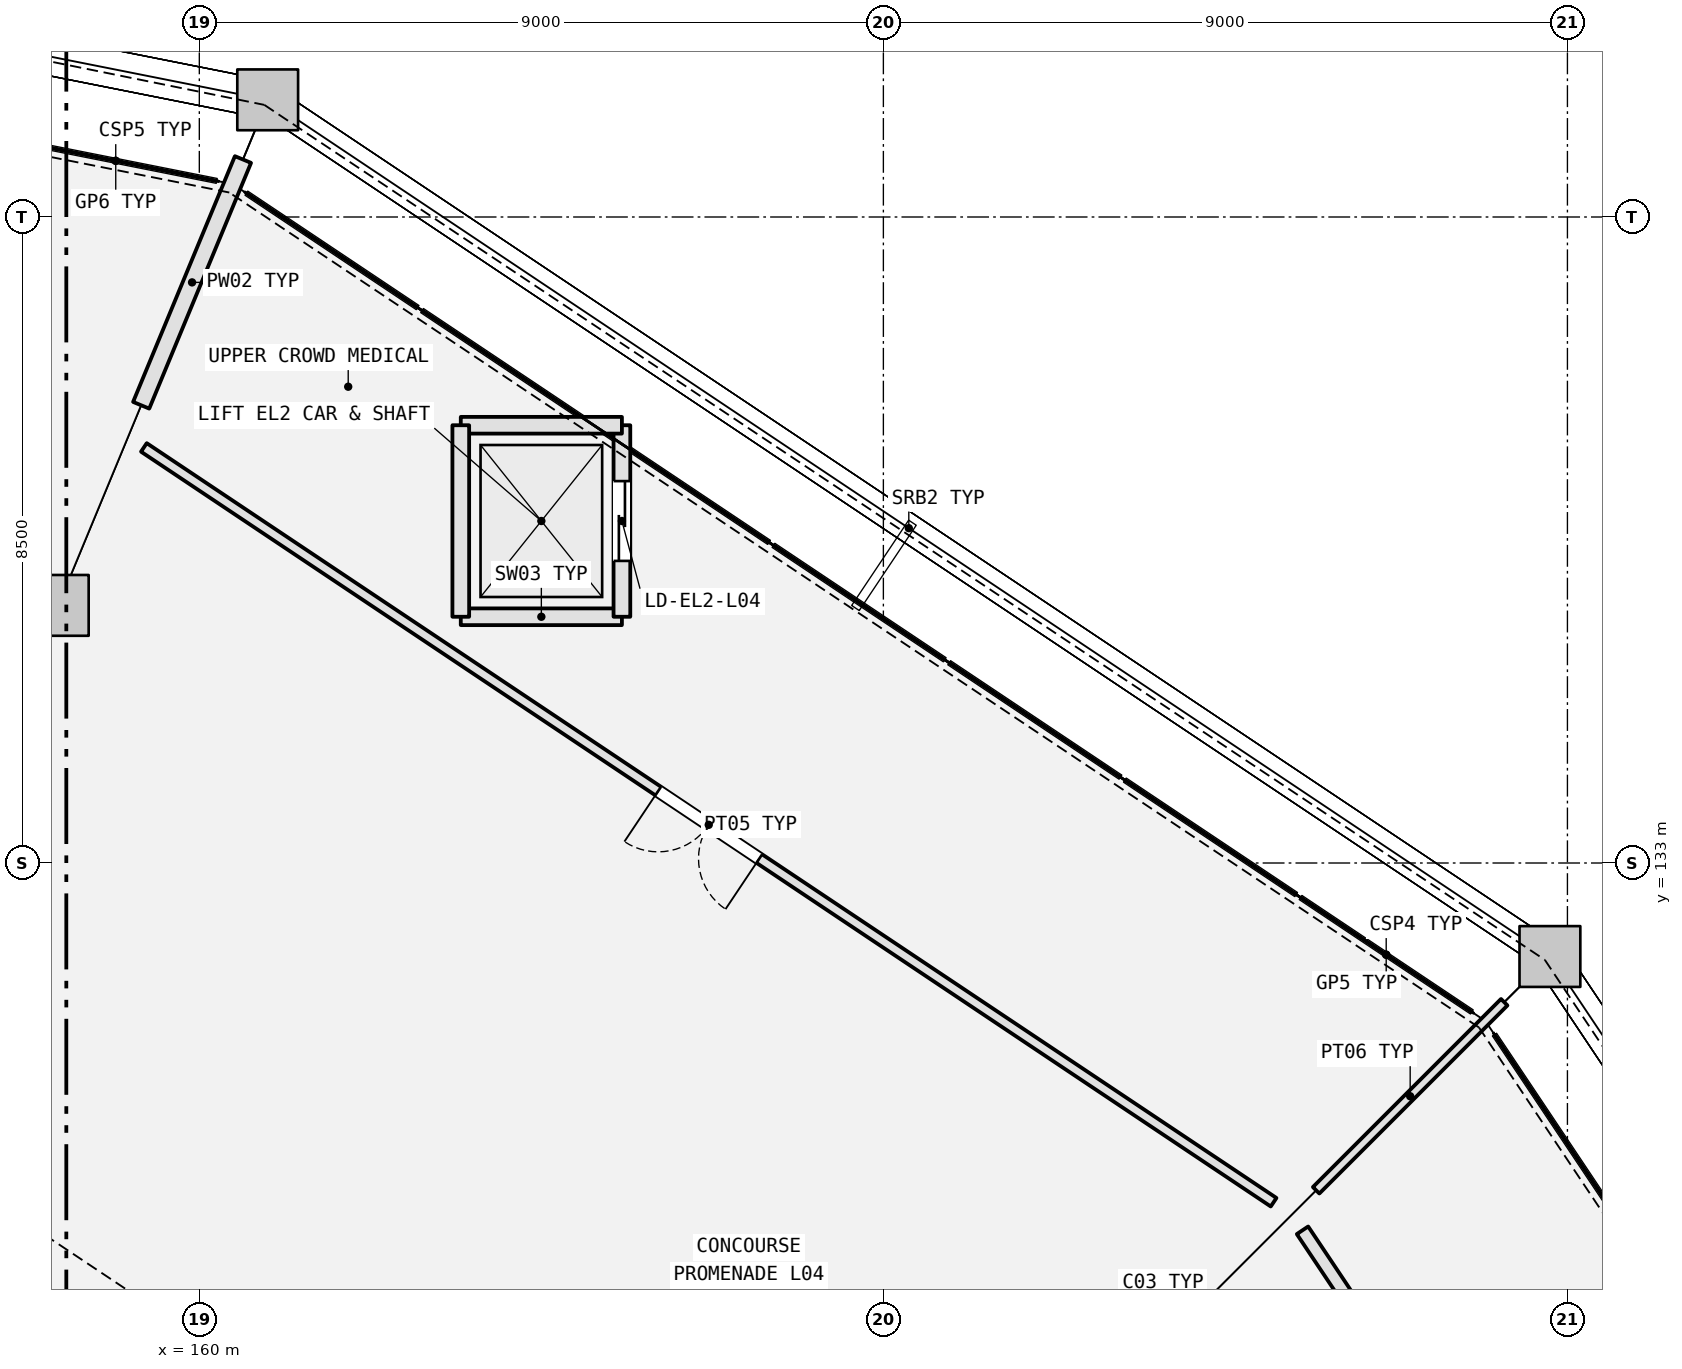
"""IFC4 building model, lengths in metres.
Left out: names, types, materials, properties, quantities, classifications, styles, units other than length and angle.
Written with IfcOpenShell. Run it as: python <this file> out.ifc"""

import sys

from ifc_helpers import new_model, si_unit, direction, frame, frame_2d, origin, origin_2d, place, context, subcontext, project, spatial, rectangle, extrude, element, fill, save


model = new_model("IFC4")
c1 = context("Model", 3, precision=1e-05, world=origin(), true_north=direction((0.0, 1.0)))
c2 = subcontext(c1, "Body", "Model", "MODEL_VIEW")
j1 = project(units=[si_unit("LENGTHUNIT", "METRE"), si_unit("PLANEANGLEUNIT", "RADIAN")], contexts=[c1])
p1 = place(None, origin())
s1 = spatial("IfcSite", under=j1, at=p1, CompositionType="ELEMENT")
p2 = place(p1, origin())
s2 = spatial("IfcBuilding", under=s1, at=p2, CompositionType="ELEMENT")
p3 = place(p2, frame((0.0, 0.0, 21.6)))
s3 = spatial("IfcBuildingStorey", under=s2, at=p3, CompositionType="ELEMENT", Elevation=21.6)
for number, where, z_axis, x_axis in (
    (1, (177.77, 131.77, 0.0), (0.0, 0.0, 1.0), (1.0, 0.0, 0.0)),
    (2, (158.144, 136.39, 0.0), (0.0, 0.0, 1.0), (1.0, 0.0, 0.0)),
    (3, (160.9, 143.042, 0.0), (0.0, 0.0, 1.0), (1.0, 0.0, 0.0)),
):
    element("IfcColumn", number, at=place(p3, frame(where, z_axis=z_axis, x_axis=x_axis)), inside=s3, PredefinedType="COLUMN", context=c2, shape_type="SweptSolid", body=[
        extrude(rectangle(XDim=0.8, YDim=0.8, at=origin_2d()), origin(), (0.0, 0.0, 1.0), 5.4),
    ])
p4 = place(p3, frame((163.44, 136.24, 0.0), z_axis=(0.0, 0.0, 1.0), x_axis=(1.0, 0.0, 0.0)))
e4 = element("IfcWall", 4, at=p4, inside=s3, PredefinedType="SHEAR", context=c2, shape_type="SweptSolid", body=[
    extrude(rectangle(XDim=2.12, YDim=0.22, at=frame_2d((1.06, 0.0))), origin(), (0.0, 0.0, 1.0), 5.15),
])
p5 = place(p3, frame((165.56, 136.24, 0.0), z_axis=(0.0, 0.0, 1.0), x_axis=(0.0, 1.0, 0.0)))
e5 = element("IfcWall", 5, at=p5, inside=s3, PredefinedType="SHEAR", context=c2, shape_type="SweptSolid", body=[
    extrude(rectangle(XDim=2.52, YDim=0.22, at=frame_2d((1.26, 0.0))), origin(), (0.0, 0.0, 1.0), 5.15),
])
p6 = place(p5, frame((0.735, 0.0, 0.0)))
e6 = element("IfcOpeningElement", 6, at=p6, cuts=e5, PredefinedType="OPENING", context=c2, shape_type="SweptSolid", body=[
    extrude(rectangle(XDim=1.05, YDim=2.15, at=frame_2d((0.525, 1.075))), frame((0.0, 0.12, 0.0), z_axis=(0.0, -1.0, 0.0), x_axis=(1.0, 0.0, 0.0)), (0.0, 0.0, 1.0), 0.24),
])
p7 = place(p3, frame((165.56, 138.76, 0.0), z_axis=(0.0, 0.0, 1.0), x_axis=(-1.0, 0.0, 0.0)))
e7 = element("IfcWall", 7, at=p7, inside=s3, PredefinedType="SHEAR", context=c2, shape_type="SweptSolid", body=[
    extrude(rectangle(XDim=2.12, YDim=0.22, at=frame_2d((1.06, 0.0))), origin(), (0.0, 0.0, 1.0), 5.15),
])
p8 = place(p3, frame((163.44, 138.76, 0.0), z_axis=(0.0, 0.0, 1.0), x_axis=(0.0, -1.0, 0.0)))
e8 = element("IfcWall", 8, at=p8, inside=s3, PredefinedType="SHEAR", context=c2, shape_type="SweptSolid", body=[
    extrude(rectangle(XDim=2.52, YDim=0.22, at=frame_2d((1.26, 0.0))), origin(), (0.0, 0.0, 1.0), 5.15),
])
p9 = place(p3, frame((184.446, 113.304, 0.0), z_axis=(0.0, 0.0, 1.0), x_axis=(-0.55556974362, 0.831469939309, 0.0)))
e9 = element("IfcWall", 9, at=p9, inside=s3, PredefinedType="PARTITIONING", context=c2, shape_type="SweptSolid", body=[
    extrude(rectangle(XDim=17.876, YDim=0.18, at=frame_2d((8.938, 0.0))), origin(), (0.0, 0.0, 1.0), 2.772),
])
p10 = place(p9, frame((8.458, 0.0, 0.0)))
e10 = element("IfcOpeningElement", 10, at=p10, cuts=e9, PredefinedType="OPENING", context=c2, shape_type="SweptSolid", body=[
    extrude(rectangle(XDim=0.96, YDim=2.15, at=frame_2d((0.48, 1.075))), frame((0.0, 0.1, 0.0), z_axis=(0.0, -1.0, 0.0), x_axis=(1.0, 0.0, 0.0)), (0.0, 0.0, 1.0), 0.2),
])
p11 = place(p3, frame((174.694, 128.694, 0.0), z_axis=(0.0, 0.0, 1.0), x_axis=(0.707106781187, 0.707106781187, 0.0)))
e11 = element("IfcWall", 11, at=p11, inside=s3, PredefinedType="PARTITIONING", context=c2, shape_type="SweptSolid", body=[
    extrude(rectangle(XDim=3.5, YDim=0.12, at=frame_2d((1.75, 0.0))), origin(), (0.0, 0.0, 1.0), 2.772),
])
p12 = place(p3, frame((174.134, 128.537, 0.0), z_axis=(0.0, 0.0, 1.0), x_axis=(-0.831469939309, 0.55556974362, 0.0)))
e12 = element("IfcWall", 12, at=p12, inside=s3, PredefinedType="PARTITIONING", context=c2, shape_type="SweptSolid", body=[
    extrude(rectangle(XDim=17.876, YDim=0.135, at=frame_2d((8.938, 0.0))), origin(), (0.0, 0.0, 1.0), 2.772),
])
p13 = place(p12, frame((8.138, 0.0, 0.0)))
e13 = element("IfcOpeningElement", 13, at=p13, cuts=e12, PredefinedType="OPENING", context=c2, shape_type="SweptSolid", body=[
    extrude(rectangle(XDim=1.6, YDim=2.2, at=frame_2d((0.8, 1.1))), frame((0.0, 0.077, 0.0), z_axis=(0.0, -1.0, 0.0), x_axis=(1.0, 0.0, 0.0)), (0.0, 0.0, 1.0), 0.155),
])
p14 = place(p3, frame((159.235, 139.023, 0.0), z_axis=(0.0, 0.0, 1.0), x_axis=(0.382643374349, 0.923896124067, 0.0)))
e14 = element("IfcWall", 14, at=p14, inside=s3, PredefinedType="PLUMBINGWALL", context=c2, shape_type="SweptSolid", body=[
    extrude(rectangle(XDim=3.5, YDim=0.23, at=frame_2d((1.75, 0.0))), origin(), (0.0, 0.0, 1.0), 2.772),
])
p15 = place(p6, origin())
e15 = element("IfcDoor", 15, at=p15, inside=s3, OperationType="DOUBLE_DOOR_SLIDING", PredefinedType="DOOR", context=c2, shape_type="SweptSolid", body=[
    extrude(rectangle(XDim=1.05, YDim=2.15, at=frame_2d((0.525, 1.075))), frame((0.0, 0.025, 0.0), z_axis=(0.0, -1.0, 0.0), x_axis=(1.0, 0.0, 0.0)), (0.0, 0.0, 1.0), 0.05),
])
fill(e6, e15)
p16 = place(p13, origin())
e16 = element("IfcDoor", 16, at=p16, inside=s3, OperationType="DOUBLE_DOOR_SINGLE_SWING", PredefinedType="DOOR", context=c2, shape_type="SweptSolid", body=[
    extrude(rectangle(XDim=1.6, YDim=2.2, at=frame_2d((0.8, 1.1))), frame((0.0, 0.025, 0.0), z_axis=(0.0, -1.0, 0.0), x_axis=(1.0, 0.0, 0.0)), (0.0, 0.0, 1.0), 0.05),
])
fill(e13, e16)
save(model, sys.argv[1])
